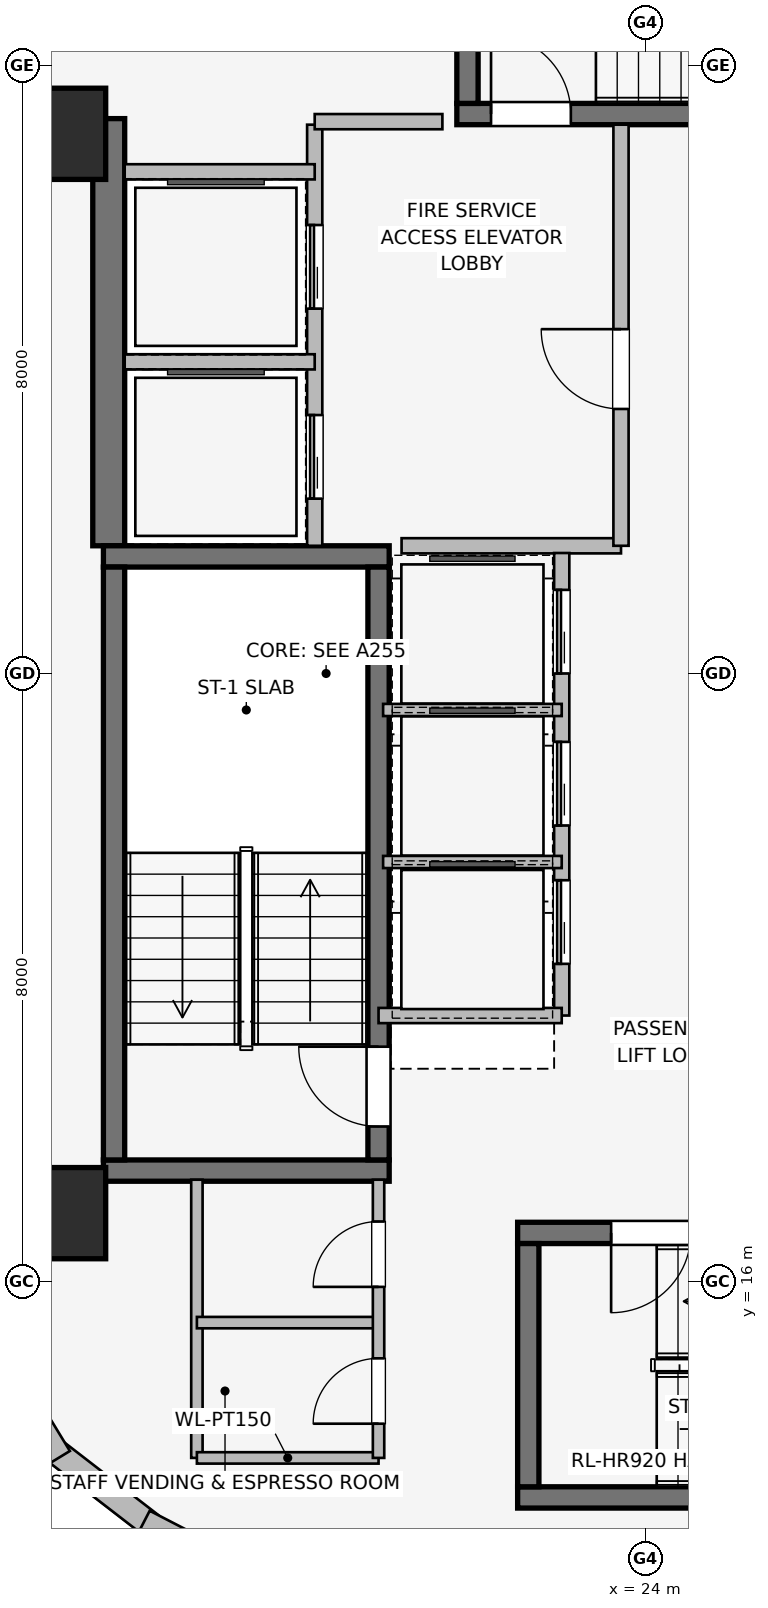
"""IFC4 building model, lengths in metres.
Left out: names, types, materials, properties, quantities, classifications, styles, units other than length and angle.
Written with IfcOpenShell. Run it as: python <this file> out.ifc"""

import sys

from ifc_helpers import new_model, si_unit, direction, frame, frame_2d, origin, origin_2d, place, context, subcontext, project, spatial, rectangle, extrude, element, fill, save


model = new_model("IFC4")
c1 = context("Model", 3, precision=1e-05, world=origin(), true_north=direction((0.0, 1.0)))
c2 = subcontext(c1, "Body", "Model", "MODEL_VIEW")
j1 = project(units=[si_unit("LENGTHUNIT", "METRE"), si_unit("PLANEANGLEUNIT", "RADIAN")], contexts=[c1])
p1 = place(None, origin())
s1 = spatial("IfcSite", under=j1, at=p1, CompositionType="ELEMENT")
p2 = place(p1, origin())
s2 = spatial("IfcBuilding", under=s1, at=p2, CompositionType="ELEMENT")
p3 = place(p2, frame((0.0, 0.0, 196.45)))
s3 = spatial("IfcBuildingStorey", under=s2, at=p3, CompositionType="ELEMENT", Elevation=196.45)
p4 = place(p3, frame((16.94, 25.68, 0.0), z_axis=(0.0, 0.0, 1.0), x_axis=(0.0, 1.0, 0.0)))
e1 = element("IfcWall", 1, at=p4, inside=s3, PredefinedType="SHEAR", context=c2, shape_type="SweptSolid", body=[
    extrude(rectangle(XDim=5.62, YDim=0.42, at=frame_2d((2.81, 0.0))), origin(), (0.0, 0.0, 1.0), 3.45),
])
for number, where, z_axis, x_axis in (
    (2, (16.87, 17.46, 0.0), (0.0, 0.0, 1.0), (1.0, 0.0, 0.0)),
    (3, (20.63, 25.54, 0.0), (0.0, 0.0, 1.0), (-1.0, 0.0, 0.0)),
):
    element("IfcWall", number, at=place(p3, frame(where, z_axis=z_axis, x_axis=x_axis)), inside=s3, PredefinedType="SHEAR", context=c2, shape_type="SweptSolid", body=[
        extrude(rectangle(XDim=3.76, YDim=0.28, at=frame_2d((1.88, 0.0))), origin(), (0.0, 0.0, 1.0), 3.45),
    ])
p5 = place(p3, frame((17.01, 25.4, 0.0), z_axis=(0.0, 0.0, 1.0), x_axis=(0.0, -1.0, 0.0)))
e4 = element("IfcWall", 4, at=p5, inside=s3, PredefinedType="SHEAR", context=c2, shape_type="SweptSolid", body=[
    extrude(rectangle(XDim=7.8, YDim=0.28, at=frame_2d((3.9, 0.0))), origin(), (0.0, 0.0, 1.0), 3.45),
])
p6 = place(p3, frame((20.49, 17.6, 0.0), z_axis=(0.0, 0.0, 1.0), x_axis=(0.0, 1.0, 0.0)))
e5 = element("IfcWall", 5, at=p6, inside=s3, PredefinedType="SHEAR", context=c2, shape_type="SweptSolid", body=[
    extrude(rectangle(XDim=7.8, YDim=0.28, at=frame_2d((3.9, 0.0))), origin(), (0.0, 0.0, 1.0), 3.45),
])
p7 = place(p6, frame((0.44, 0.0, 0.0)))
e6 = element("IfcOpeningElement", 6, at=p7, cuts=e5, PredefinedType="OPENING", context=c2, shape_type="SweptSolid", body=[
    extrude(rectangle(XDim=1.05, YDim=2.0, at=frame_2d((0.525, 1.0))), frame((0.0, 0.15, 0.0), z_axis=(0.0, -1.0, 0.0), x_axis=(1.0, 0.0, 0.0)), (0.0, 0.0, 1.0), 0.3),
])
p8 = place(p3, frame((22.32, 13.16, 0.0), z_axis=(0.0, 0.0, 1.0), x_axis=(1.0, 0.0, 0.0)))
e7 = element("IfcWall", 7, at=p8, inside=s3, PredefinedType="SHEAR", context=c2, shape_type="SweptSolid", body=[
    extrude(rectangle(XDim=8.36, YDim=0.28, at=frame_2d((4.18, 0.0))), origin(), (0.0, 0.0, 1.0), 3.45),
])
p9 = place(p3, frame((30.68, 16.64, 0.0), z_axis=(0.0, 0.0, 1.0), x_axis=(-1.0, 0.0, 0.0)))
e8 = element("IfcWall", 8, at=p9, inside=s3, PredefinedType="SHEAR", context=c2, shape_type="SweptSolid", body=[
    extrude(rectangle(XDim=8.36, YDim=0.28, at=frame_2d((4.18, 0.0))), origin(), (0.0, 0.0, 1.0), 3.45),
])
p10 = place(p9, frame((6.08, 0.0, 0.0)))
e9 = element("IfcOpeningElement", 9, at=p10, cuts=e8, PredefinedType="OPENING", context=c2, shape_type="SweptSolid", body=[
    extrude(rectangle(XDim=1.05, YDim=2.0, at=frame_2d((0.525, 1.0))), frame((0.0, 0.15, 0.0), z_axis=(0.0, -1.0, 0.0), x_axis=(1.0, 0.0, 0.0)), (0.0, 0.0, 1.0), 0.3),
])
p11 = place(p3, frame((22.46, 16.5, 0.0), z_axis=(0.0, 0.0, 1.0), x_axis=(0.0, -1.0, 0.0)))
e10 = element("IfcWall", 10, at=p11, inside=s3, PredefinedType="SHEAR", context=c2, shape_type="SweptSolid", body=[
    extrude(rectangle(XDim=3.2, YDim=0.28, at=frame_2d((1.6, 0.0))), origin(), (0.0, 0.0, 1.0), 3.45),
])
p12 = place(p3, frame((21.52, 31.36, 0.0), z_axis=(0.0, 0.0, 1.0), x_axis=(1.0, 0.0, 0.0)))
e11 = element("IfcWall", 11, at=p12, inside=s3, PredefinedType="SHEAR", context=c2, shape_type="SweptSolid", body=[
    extrude(rectangle(XDim=8.36, YDim=0.28, at=frame_2d((4.18, 0.0))), origin(), (0.0, 0.0, 1.0), 3.45),
])
p13 = place(p12, frame((0.45, 0.0, 0.0)))
e12 = element("IfcOpeningElement", 12, at=p13, cuts=e11, PredefinedType="OPENING", context=c2, shape_type="SweptSolid", body=[
    extrude(rectangle(XDim=1.05, YDim=2.0, at=frame_2d((0.525, 1.0))), frame((0.0, 0.15, 0.0), z_axis=(0.0, -1.0, 0.0), x_axis=(1.0, 0.0, 0.0)), (0.0, 0.0, 1.0), 0.3),
])
p14 = place(p3, frame((21.66, 34.7, 0.0), z_axis=(0.0, 0.0, 1.0), x_axis=(0.0, -1.0, 0.0)))
e13 = element("IfcWall", 13, at=p14, inside=s3, PredefinedType="SHEAR", context=c2, shape_type="SweptSolid", body=[
    extrude(rectangle(XDim=3.2, YDim=0.28, at=frame_2d((1.6, 0.0))), origin(), (0.0, 0.0, 1.0), 3.45),
])
for number, where, z_axis, x_axis in (
    (14, (16.3, 16.9, 0.0), (0.0, 0.0, 1.0), (1.0, 0.0, 0.0)),
    (15, (16.3, 31.1, 0.0), (0.0, 0.0, 1.0), (1.0, 0.0, 0.0)),
):
    element("IfcColumn", number, at=place(p3, frame(where, z_axis=z_axis, x_axis=x_axis)), inside=s3, PredefinedType="COLUMN", context=c2, shape_type="SweptSolid", body=[
        extrude(rectangle(XDim=1.2, YDim=1.2, at=origin_2d()), origin(), (0.0, 0.0, 1.0), 3.45),
    ])
p15 = place(p3, frame((17.489, 12.8, 0.0), z_axis=(0.0, 0.0, 1.0), x_axis=(-0.791409877269, 0.611285862884, 0.0)))
e16 = element("IfcWall", 16, at=p15, inside=s3, PredefinedType="STANDARD", context=c2, shape_type="SweptSolid", body=[
    extrude(rectangle(XDim=1.677, YDim=0.33, at=frame_2d((0.838, 0.0))), origin(), (0.0, 0.0, 1.0), 3.19),
])
p16 = place(p3, frame((16.288, 13.685, 0.0), z_axis=(0.0, 0.0, 1.0), x_axis=(-0.520325409202, 0.853968072318, 0.0)))
e17 = element("IfcWall", 17, at=p16, inside=s3, PredefinedType="STANDARD", context=c2, shape_type="SweptSolid", body=[
    extrude(rectangle(XDim=1.678, YDim=0.33, at=frame_2d((0.839, 0.0))), origin(), (0.0, 0.0, 1.0), 3.19),
])
p17 = place(p3, frame((32.362, 5.129, 0.0), z_axis=(0.0, 0.0, 1.0), x_axis=(-0.888626188278, 0.458632202867, 0.0)))
e18 = element("IfcWall", 18, at=p17, inside=s3, PredefinedType="STANDARD", context=c2, shape_type="SweptSolid", body=[
    extrude(rectangle(XDim=16.828, YDim=0.31, at=frame_2d((8.414, 0.0))), origin(), (0.0, 0.0, 1.0), 3.19),
])
p18 = place(p17, frame((0.675, 0.0, 0.75)))
e19 = element("IfcOpeningElement", 19, at=p18, cuts=e18, PredefinedType="OPENING", context=c2, shape_type="SweptSolid", body=[
    extrude(rectangle(XDim=2.0, YDim=1.5, at=frame_2d((1.0, 0.75))), frame((0.0, 0.165, 0.0), z_axis=(0.0, -1.0, 0.0), x_axis=(1.0, 0.0, 0.0)), (0.0, 0.0, 1.0), 0.33),
])
p19 = place(p17, frame((4.75, 0.0, 0.75)))
e20 = element("IfcOpeningElement", 20, at=p19, cuts=e18, PredefinedType="OPENING", context=c2, shape_type="SweptSolid", body=[
    extrude(rectangle(XDim=1.35, YDim=1.45, at=frame_2d((0.675, 0.725))), frame((0.0, 0.165, 0.0), z_axis=(0.0, -1.0, 0.0), x_axis=(1.0, 0.0, 0.0)), (0.0, 0.0, 1.0), 0.33),
])
p20 = place(p17, frame((7.739, 0.0, 0.75)))
e21 = element("IfcOpeningElement", 21, at=p20, cuts=e18, PredefinedType="OPENING", context=c2, shape_type="SweptSolid", body=[
    extrude(rectangle(XDim=1.35, YDim=1.45, at=frame_2d((0.675, 0.725))), frame((0.0, 0.165, 0.0), z_axis=(0.0, -1.0, 0.0), x_axis=(1.0, 0.0, 0.0)), (0.0, 0.0, 1.0), 0.33),
])
p21 = place(p17, frame((10.728, 0.0, 0.75)))
e22 = element("IfcOpeningElement", 22, at=p21, cuts=e18, PredefinedType="OPENING", context=c2, shape_type="SweptSolid", body=[
    extrude(rectangle(XDim=1.35, YDim=1.45, at=frame_2d((0.675, 0.725))), frame((0.0, 0.165, 0.0), z_axis=(0.0, -1.0, 0.0), x_axis=(1.0, 0.0, 0.0)), (0.0, 0.0, 1.0), 0.33),
])
p22 = place(p17, frame((14.885, 0.0, 0.75)))
e23 = element("IfcOpeningElement", 23, at=p22, cuts=e18, PredefinedType="OPENING", context=c2, shape_type="SweptSolid", body=[
    extrude(rectangle(XDim=1.05, YDim=1.4, at=frame_2d((0.525, 0.7))), frame((0.0, 0.165, 0.0), z_axis=(0.0, -1.0, 0.0), x_axis=(1.0, 0.0, 0.0)), (0.0, 0.0, 1.0), 0.33),
])
p23 = place(p3, frame((19.65, 25.68, 0.0), z_axis=(0.0, 0.0, 1.0), x_axis=(0.0, 1.0, 0.0)))
e24 = element("IfcWall", 24, at=p23, inside=s3, PredefinedType="PARTITIONING", context=c2, shape_type="SweptSolid", body=[
    extrude(rectangle(XDim=5.54, YDim=0.2, at=frame_2d((2.77, 0.0))), origin(), (0.0, 0.0, 1.0), 3.19),
])
p24 = place(p23, frame((0.62, 0.0, 0.0)))
e25 = element("IfcOpeningElement", 25, at=p24, cuts=e24, PredefinedType="OPENING", context=c2, shape_type="SweptSolid", body=[
    extrude(rectangle(XDim=1.1, YDim=2.2, at=frame_2d((0.55, 1.1))), frame((0.0, 0.11, 0.0), z_axis=(0.0, -1.0, 0.0), x_axis=(1.0, 0.0, 0.0)), (0.0, 0.0, 1.0), 0.22),
])
p25 = place(p23, frame((3.12, 0.0, 0.0)))
e26 = element("IfcOpeningElement", 26, at=p25, cuts=e24, PredefinedType="OPENING", context=c2, shape_type="SweptSolid", body=[
    extrude(rectangle(XDim=1.1, YDim=2.2, at=frame_2d((0.55, 1.1))), frame((0.0, 0.11, 0.0), z_axis=(0.0, -1.0, 0.0), x_axis=(1.0, 0.0, 0.0)), (0.0, 0.0, 1.0), 0.22),
])
p26 = place(p3, frame((20.793, 25.68, 0.0), z_axis=(0.0, 0.0, 1.0), x_axis=(1.0, 0.0, 0.0)))
e27 = element("IfcWall", 27, at=p26, inside=s3, PredefinedType="PARTITIONING", context=c2, shape_type="SweptSolid", body=[
    extrude(rectangle(XDim=2.887, YDim=0.2, at=frame_2d((1.443, 0.0))), origin(), (0.0, 0.0, 1.0), 3.19),
])
p27 = place(p3, frame((23.68, 25.68, 0.0), z_axis=(0.0, 0.0, 1.0), x_axis=(0.0, 1.0, 0.0)))
e28 = element("IfcWall", 28, at=p27, inside=s3, PredefinedType="PARTITIONING", context=c2, shape_type="SweptSolid", body=[
    extrude(rectangle(XDim=5.54, YDim=0.2, at=frame_2d((2.77, 0.0))), origin(), (0.0, 0.0, 1.0), 3.19),
])
p28 = place(p27, frame((1.8, 0.0, 0.0)))
e29 = element("IfcOpeningElement", 29, at=p28, cuts=e28, PredefinedType="OPENING", context=c2, shape_type="SweptSolid", body=[
    extrude(rectangle(XDim=1.05, YDim=2.0, at=frame_2d((0.525, 1.0))), frame((0.0, 0.11, 0.0), z_axis=(0.0, -1.0, 0.0), x_axis=(1.0, 0.0, 0.0)), (0.0, 0.0, 1.0), 0.22),
])
p29 = place(p3, frame((21.33, 31.26, 0.0), z_axis=(0.0, 0.0, 1.0), x_axis=(-1.0, 0.0, 0.0)))
e30 = element("IfcWall", 30, at=p29, inside=s3, PredefinedType="PARTITIONING", context=c2, shape_type="SweptSolid", body=[
    extrude(rectangle(XDim=1.68, YDim=0.2, at=frame_2d((0.84, 0.0))), origin(), (0.0, 0.0, 1.0), 3.19),
])
p30 = place(p3, frame((17.15, 28.1, 0.0), z_axis=(0.0, 0.0, 1.0), x_axis=(1.0, 0.0, 0.0)))
e31 = element("IfcWall", 31, at=p30, inside=s3, PredefinedType="PARTITIONING", context=c2, shape_type="SweptSolid", body=[
    extrude(rectangle(XDim=2.5, YDim=0.2, at=frame_2d((1.25, 0.0))), origin(), (0.0, 0.0, 1.0), 3.19),
])
p31 = place(p3, frame((19.65, 30.6, 0.0), z_axis=(0.0, 0.0, 1.0), x_axis=(-1.0, 0.0, 0.0)))
e32 = element("IfcWall", 32, at=p31, inside=s3, PredefinedType="PARTITIONING", context=c2, shape_type="SweptSolid", body=[
    extrude(rectangle(XDim=2.5, YDim=0.2, at=frame_2d((1.25, 0.0))), origin(), (0.0, 0.0, 1.0), 2.09),
])
p32 = place(p3, frame((22.9, 19.5, 0.0), z_axis=(0.0, 0.0, 1.0), x_axis=(0.0, 1.0, 0.0)))
e33 = element("IfcWall", 33, at=p32, inside=s3, PredefinedType="PARTITIONING", context=c2, shape_type="SweptSolid", body=[
    extrude(rectangle(XDim=6.085, YDim=0.2, at=frame_2d((3.042, 0.0))), origin(), (0.0, 0.0, 1.0), 3.19),
])
p33 = place(p32, frame((0.68, 0.0, 0.0)))
e34 = element("IfcOpeningElement", 34, at=p33, cuts=e33, PredefinedType="OPENING", context=c2, shape_type="SweptSolid", body=[
    extrude(rectangle(XDim=1.1, YDim=2.2, at=frame_2d((0.55, 1.1))), frame((0.0, 0.11, 0.0), z_axis=(0.0, -1.0, 0.0), x_axis=(1.0, 0.0, 0.0)), (0.0, 0.0, 1.0), 0.22),
])
p34 = place(p32, frame((2.5, 0.0, 0.0)))
e35 = element("IfcOpeningElement", 35, at=p34, cuts=e33, PredefinedType="OPENING", context=c2, shape_type="SweptSolid", body=[
    extrude(rectangle(XDim=1.1, YDim=2.2, at=frame_2d((0.55, 1.1))), frame((0.0, 0.11, 0.0), z_axis=(0.0, -1.0, 0.0), x_axis=(1.0, 0.0, 0.0)), (0.0, 0.0, 1.0), 0.22),
])
p35 = place(p32, frame((4.5, 0.0, 0.0)))
e36 = element("IfcOpeningElement", 36, at=p35, cuts=e33, PredefinedType="OPENING", context=c2, shape_type="SweptSolid", body=[
    extrude(rectangle(XDim=1.1, YDim=2.2, at=frame_2d((0.55, 1.1))), frame((0.0, 0.11, 0.0), z_axis=(0.0, -1.0, 0.0), x_axis=(1.0, 0.0, 0.0)), (0.0, 0.0, 1.0), 0.22),
])
p36 = place(p3, frame((20.49, 19.5, 0.0), z_axis=(0.0, 0.0, 1.0), x_axis=(1.0, 0.0, 0.0)))
e37 = element("IfcWall", 37, at=p36, inside=s3, PredefinedType="PARTITIONING", context=c2, shape_type="SweptSolid", body=[
    extrude(rectangle(XDim=2.41, YDim=0.2, at=frame_2d((1.205, 0.0))), origin(), (0.0, 0.0, 1.0), 2.09),
])
for number, where, z_axis, x_axis in (
    (38, (20.55, 21.52, 0.0), (0.0, 0.0, 1.0), (1.0, 0.0, 0.0)),
    (39, (20.55, 23.52, 0.0), (0.0, 0.0, 1.0), (1.0, 0.0, 0.0)),
):
    element("IfcWall", number, at=place(p3, frame(where, z_axis=z_axis, x_axis=x_axis)), inside=s3, PredefinedType="PARTITIONING", context=c2, shape_type="SweptSolid", body=[
        extrude(rectangle(XDim=2.35, YDim=0.16, at=frame_2d((1.175, 0.0))), origin(), (0.0, 0.0, 1.0), 3.19),
    ])
p37 = place(p3, frame((18.1, 17.34, 0.0), z_axis=(0.0, 0.0, 1.0), x_axis=(0.0, -1.0, 0.0)))
e40 = element("IfcWall", 40, at=p37, inside=s3, PredefinedType="PARTITIONING", context=c2, shape_type="SweptSolid", body=[
    extrude(rectangle(XDim=3.66, YDim=0.15, at=frame_2d((1.83, 0.0))), origin(), (0.0, 0.0, 1.0), 3.19),
])
for number, where, z_axis, x_axis in (
    (41, (18.1, 13.68, 0.0), (0.0, 0.0, 1.0), (1.0, 0.0, 0.0)),
    (42, (18.1, 15.46, 0.0), (0.0, 0.0, 1.0), (1.0, 0.0, 0.0)),
):
    element("IfcWall", number, at=place(p3, frame(where, z_axis=z_axis, x_axis=x_axis)), inside=s3, PredefinedType="PARTITIONING", context=c2, shape_type="SweptSolid", body=[
        extrude(rectangle(XDim=2.39, YDim=0.15, at=frame_2d((1.195, 0.0))), origin(), (0.0, 0.0, 1.0), 3.19),
    ])
p38 = place(p3, frame((20.49, 13.68, 0.0), z_axis=(0.0, 0.0, 1.0), x_axis=(0.0, 1.0, 0.0)))
e43 = element("IfcWall", 43, at=p38, inside=s3, PredefinedType="PARTITIONING", context=c2, shape_type="SweptSolid", body=[
    extrude(rectangle(XDim=3.66, YDim=0.15, at=frame_2d((1.83, 0.0))), origin(), (0.0, 0.0, 1.0), 3.19),
])
p39 = place(p38, frame((0.45, 0.0, 0.0)))
e44 = element("IfcOpeningElement", 44, at=p39, cuts=e43, PredefinedType="OPENING", context=c2, shape_type="SweptSolid", body=[
    extrude(rectangle(XDim=0.86, YDim=2.0, at=frame_2d((0.43, 1.0))), frame((0.0, 0.085, 0.0), z_axis=(0.0, -1.0, 0.0), x_axis=(1.0, 0.0, 0.0)), (0.0, 0.0, 1.0), 0.17),
])
p40 = place(p38, frame((2.25, 0.0, 0.0)))
e45 = element("IfcOpeningElement", 45, at=p40, cuts=e43, PredefinedType="OPENING", context=c2, shape_type="SweptSolid", body=[
    extrude(rectangle(XDim=0.86, YDim=2.0, at=frame_2d((0.43, 1.0))), frame((0.0, 0.085, 0.0), z_axis=(0.0, -1.0, 0.0), x_axis=(1.0, 0.0, 0.0)), (0.0, 0.0, 1.0), 0.17),
])
p41 = place(p7, origin())
e46 = element("IfcDoor", 46, at=p41, inside=s3, OperationType="SINGLE_SWING_RIGHT", PredefinedType="DOOR", context=c2, shape_type="SweptSolid", body=[
    extrude(rectangle(XDim=1.05, YDim=2.0, at=frame_2d((0.525, 1.0))), frame((0.0, 0.025, 0.0), z_axis=(0.0, -1.0, 0.0), x_axis=(1.0, 0.0, 0.0)), (0.0, 0.0, 1.0), 0.05),
])
fill(e6, e46)
p42 = place(p10, origin())
e47 = element("IfcDoor", 47, at=p42, inside=s3, OperationType="SINGLE_SWING_RIGHT", PredefinedType="DOOR", context=c2, shape_type="SweptSolid", body=[
    extrude(rectangle(XDim=1.05, YDim=2.0, at=frame_2d((0.525, 1.0))), frame((0.0, 0.025, 0.0), z_axis=(0.0, -1.0, 0.0), x_axis=(1.0, 0.0, 0.0)), (0.0, 0.0, 1.0), 0.05),
])
fill(e9, e47)
p43 = place(p13, origin())
e48 = element("IfcDoor", 48, at=p43, inside=s3, OperationType="SINGLE_SWING_LEFT", PredefinedType="DOOR", context=c2, shape_type="SweptSolid", body=[
    extrude(rectangle(XDim=1.05, YDim=2.0, at=frame_2d((0.525, 1.0))), frame((0.0, 0.025, 0.0), z_axis=(0.0, -1.0, 0.0), x_axis=(1.0, 0.0, 0.0)), (0.0, 0.0, 1.0), 0.05),
])
fill(e12, e48)
p44 = place(p24, origin())
e49 = element("IfcDoor", 49, at=p44, inside=s3, OperationType="SLIDING_TO_LEFT", PredefinedType="DOOR", context=c2, shape_type="SweptSolid", body=[
    extrude(rectangle(XDim=1.1, YDim=2.2, at=frame_2d((0.55, 1.1))), frame((0.0, 0.025, 0.0), z_axis=(0.0, -1.0, 0.0), x_axis=(1.0, 0.0, 0.0)), (0.0, 0.0, 1.0), 0.05),
])
fill(e25, e49)
p45 = place(p25, origin())
e50 = element("IfcDoor", 50, at=p45, inside=s3, OperationType="SLIDING_TO_LEFT", PredefinedType="DOOR", context=c2, shape_type="SweptSolid", body=[
    extrude(rectangle(XDim=1.1, YDim=2.2, at=frame_2d((0.55, 1.1))), frame((0.0, 0.025, 0.0), z_axis=(0.0, -1.0, 0.0), x_axis=(1.0, 0.0, 0.0)), (0.0, 0.0, 1.0), 0.05),
])
fill(e26, e50)
p46 = place(p28, origin())
e51 = element("IfcDoor", 51, at=p46, inside=s3, OperationType="SINGLE_SWING_RIGHT", PredefinedType="DOOR", context=c2, shape_type="SweptSolid", body=[
    extrude(rectangle(XDim=1.05, YDim=2.0, at=frame_2d((0.525, 1.0))), frame((0.0, 0.025, 0.0), z_axis=(0.0, -1.0, 0.0), x_axis=(1.0, 0.0, 0.0)), (0.0, 0.0, 1.0), 0.05),
])
fill(e29, e51)
p47 = place(p33, origin())
e52 = element("IfcDoor", 52, at=p47, inside=s3, OperationType="SLIDING_TO_LEFT", PredefinedType="DOOR", context=c2, shape_type="SweptSolid", body=[
    extrude(rectangle(XDim=1.1, YDim=2.2, at=frame_2d((0.55, 1.1))), frame((0.0, 0.025, 0.0), z_axis=(0.0, -1.0, 0.0), x_axis=(1.0, 0.0, 0.0)), (0.0, 0.0, 1.0), 0.05),
])
fill(e34, e52)
p48 = place(p34, origin())
e53 = element("IfcDoor", 53, at=p48, inside=s3, OperationType="SLIDING_TO_LEFT", PredefinedType="DOOR", context=c2, shape_type="SweptSolid", body=[
    extrude(rectangle(XDim=1.1, YDim=2.2, at=frame_2d((0.55, 1.1))), frame((0.0, 0.025, 0.0), z_axis=(0.0, -1.0, 0.0), x_axis=(1.0, 0.0, 0.0)), (0.0, 0.0, 1.0), 0.05),
])
fill(e35, e53)
p49 = place(p35, origin())
e54 = element("IfcDoor", 54, at=p49, inside=s3, OperationType="SLIDING_TO_LEFT", PredefinedType="DOOR", context=c2, shape_type="SweptSolid", body=[
    extrude(rectangle(XDim=1.1, YDim=2.2, at=frame_2d((0.55, 1.1))), frame((0.0, 0.025, 0.0), z_axis=(0.0, -1.0, 0.0), x_axis=(1.0, 0.0, 0.0)), (0.0, 0.0, 1.0), 0.05),
])
fill(e36, e54)
p50 = place(p39, origin())
e55 = element("IfcDoor", 55, at=p50, inside=s3, OperationType="SINGLE_SWING_LEFT", PredefinedType="DOOR", context=c2, shape_type="SweptSolid", body=[
    extrude(rectangle(XDim=0.86, YDim=2.0, at=frame_2d((0.43, 1.0))), frame((0.0, 0.025, 0.0), z_axis=(0.0, -1.0, 0.0), x_axis=(1.0, 0.0, 0.0)), (0.0, 0.0, 1.0), 0.05),
])
fill(e44, e55)
p51 = place(p40, origin())
e56 = element("IfcDoor", 56, at=p51, inside=s3, OperationType="SINGLE_SWING_LEFT", PredefinedType="DOOR", context=c2, shape_type="SweptSolid", body=[
    extrude(rectangle(XDim=0.86, YDim=2.0, at=frame_2d((0.43, 1.0))), frame((0.0, 0.025, 0.0), z_axis=(0.0, -1.0, 0.0), x_axis=(1.0, 0.0, 0.0)), (0.0, 0.0, 1.0), 0.05),
])
fill(e45, e56)
save(model, sys.argv[1])
